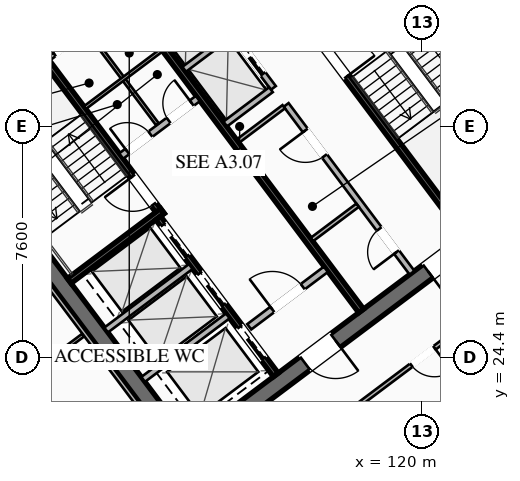
"""IFC4 building model, lengths in metres.
Left out: names, types, materials, properties, quantities, classifications, styles, units other than length and angle.
Written with IfcOpenShell. Run it as: python <this file> out.ifc"""

import sys

from ifc_helpers import new_model, si_unit, direction, frame, frame_2d, origin, place, context, subcontext, project, spatial, rectangle, extrude, element, fill, save


model = new_model("IFC4")
c1 = context("Model", 3, precision=1e-05, world=origin(), true_north=direction((0.0, 1.0)))
c2 = subcontext(c1, "Body", "Model", "MODEL_VIEW")
j1 = project(units=[si_unit("LENGTHUNIT", "METRE"), si_unit("PLANEANGLEUNIT", "RADIAN")], contexts=[c1])
p1 = place(None, origin())
s1 = spatial("IfcSite", under=j1, at=p1, CompositionType="ELEMENT")
p2 = place(p1, origin())
s2 = spatial("IfcBuilding", under=s1, at=p2, CompositionType="ELEMENT")
p3 = place(p2, frame((0.0, 0.0, 160.55)))
s3 = spatial("IfcBuildingStorey", under=s2, at=p3, CompositionType="ELEMENT", Elevation=160.55)
for number, where, z_axis, x_axis in (
    (1, (112.436, 21.077, 0.0), (0.0, 0.0, 1.0), (-0.6, 0.8, 0.0)),
    (2, (115.564, 42.923, 0.0), (0.0, 0.0, 1.0), (0.6, -0.8, 0.0)),
):
    element("IfcWall", number, at=place(p3, frame(where, z_axis=z_axis, x_axis=x_axis)), inside=s3, PredefinedType="SHEAR", context=c2, shape_type="SweptSolid", body=[
        extrude(rectangle(XDim=15.6, YDim=0.55, at=frame_2d((7.8, 0.0))), origin(), (0.0, 0.0, 1.0), 3.55),
    ])
p4 = place(p3, frame((124.539, 30.498, 0.0), z_axis=(0.0, 0.0, 1.0), x_axis=(-0.799998054672, -0.600002593761, 0.0)))
e3 = element("IfcWall", 3, at=p4, inside=s3, PredefinedType="SHEAR", context=c2, shape_type="SweptSolid", body=[
    extrude(rectangle(XDim=15.06, YDim=0.55, at=frame_2d((7.53, 0.0))), origin(), (0.0, 0.0, 1.0), 3.55),
])
p5 = place(p4, frame((9.23, 0.0, 0.0)))
e4 = element("IfcOpeningElement", 4, at=p5, cuts=e3, PredefinedType="OPENING", context=c2, shape_type="SweptSolid", body=[
    extrude(rectangle(XDim=1.25, YDim=2.25, at=frame_2d((0.625, 1.125))), frame((0.0, 0.285, 0.0), z_axis=(0.0, -1.0, 0.0), x_axis=(1.0, 0.0, 0.0)), (0.0, 0.0, 1.0), 0.57),
])
p6 = place(p4, frame((4.18, 0.0, 0.0)))
e5 = element("IfcOpeningElement", 5, at=p6, cuts=e3, PredefinedType="OPENING", context=c2, shape_type="SweptSolid", body=[
    extrude(rectangle(XDim=1.25, YDim=2.25, at=frame_2d((0.625, 1.125))), frame((0.0, 0.285, 0.0), z_axis=(0.0, -1.0, 0.0), x_axis=(1.0, 0.0, 0.0)), (0.0, 0.0, 1.0), 0.57),
])
p7 = place(p3, frame((103.461, 33.502, 0.0), z_axis=(0.0, 0.0, 1.0), x_axis=(0.799998054672, 0.600002593761, 0.0)))
e6 = element("IfcWall", 6, at=p7, inside=s3, PredefinedType="SHEAR", context=c2, shape_type="SweptSolid", body=[
    extrude(rectangle(XDim=15.06, YDim=0.55, at=frame_2d((7.53, 0.0))), origin(), (0.0, 0.0, 1.0), 3.55),
])
p8 = place(p7, frame((4.58, 0.0, 0.0)))
e7 = element("IfcOpeningElement", 7, at=p8, cuts=e6, PredefinedType="OPENING", context=c2, shape_type="SweptSolid", body=[
    extrude(rectangle(XDim=1.25, YDim=2.25, at=frame_2d((0.625, 1.125))), frame((0.0, 0.285, 0.0), z_axis=(0.0, -1.0, 0.0), x_axis=(1.0, 0.0, 0.0)), (0.0, 0.0, 1.0), 0.57),
])
p9 = place(p7, frame((9.63, 0.0, 0.0)))
e8 = element("IfcOpeningElement", 8, at=p9, cuts=e6, PredefinedType="OPENING", context=c2, shape_type="SweptSolid", body=[
    extrude(rectangle(XDim=1.25, YDim=2.25, at=frame_2d((0.625, 1.125))), frame((0.0, 0.285, 0.0), z_axis=(0.0, -1.0, 0.0), x_axis=(1.0, 0.0, 0.0)), (0.0, 0.0, 1.0), 0.57),
])
p10 = place(p3, frame((111.44, 29.08, 0.0), z_axis=(0.0, 0.0, 1.0), x_axis=(-0.59999029481, 0.8000072788, 0.0)))
e9 = element("IfcWall", 9, at=p10, inside=s3, PredefinedType="SHEAR", context=c2, shape_type="SweptSolid", body=[
    extrude(rectangle(XDim=8.05, YDim=0.2, at=frame_2d((4.025, 0.0))), origin(), (0.0, 0.0, 1.0), 3.37),
])
p11 = place(p10, frame((0.45, 0.0, 0.0)))
e10 = element("IfcOpeningElement", 10, at=p11, cuts=e9, PredefinedType="OPENING", context=c2, shape_type="SweptSolid", body=[
    extrude(rectangle(XDim=1.15, YDim=2.2, at=frame_2d((0.575, 1.1))), frame((0.0, 0.11, 0.0), z_axis=(0.0, -1.0, 0.0), x_axis=(1.0, 0.0, 0.0)), (0.0, 0.0, 1.0), 0.22),
])
p12 = place(p3, frame((108.396, 26.922, 0.0), z_axis=(0.0, 0.0, 1.0), x_axis=(0.800015298837, 0.599979601008, 0.0)))
e11 = element("IfcWall", 11, at=p12, inside=s3, PredefinedType="SHEAR", context=c2, shape_type="SweptSolid", body=[
    extrude(rectangle(XDim=3.83, YDim=0.2, at=frame_2d((1.915, 0.0))), origin(), (0.0, 0.0, 1.0), 3.37),
])
p13 = place(p3, frame((116.56, 34.92, 0.0), z_axis=(0.0, 0.0, 1.0), x_axis=(0.59999029481, -0.8000072788, 0.0)))
e12 = element("IfcWall", 12, at=p13, inside=s3, PredefinedType="SHEAR", context=c2, shape_type="SweptSolid", body=[
    extrude(rectangle(XDim=8.05, YDim=0.2, at=frame_2d((4.025, 0.0))), origin(), (0.0, 0.0, 1.0), 3.37),
])
p14 = place(p13, frame((0.45, 0.0, 0.0)))
e13 = element("IfcOpeningElement", 13, at=p14, cuts=e12, PredefinedType="OPENING", context=c2, shape_type="SweptSolid", body=[
    extrude(rectangle(XDim=1.15, YDim=2.2, at=frame_2d((0.575, 1.1))), frame((0.0, 0.11, 0.0), z_axis=(0.0, -1.0, 0.0), x_axis=(1.0, 0.0, 0.0)), (0.0, 0.0, 1.0), 0.22),
])
p15 = place(p3, frame((117.998, 25.936, 0.0), z_axis=(0.0, 0.0, 1.0), x_axis=(-0.600002693989, 0.799997979501, 0.0)))
e14 = element("IfcWall", 14, at=p15, inside=s3, PredefinedType="SHEAR", context=c2, shape_type="SweptSolid", body=[
    extrude(rectangle(XDim=14.5, YDim=0.2, at=frame_2d((7.25, 0.0))), origin(), (0.0, 0.0, 1.0), 3.37),
])
p16 = place(p3, frame((110.104, 31.028, 0.0), z_axis=(0.0, 0.0, 1.0), x_axis=(0.800018601094, 0.59997519774, 0.0)))
e15 = element("IfcWall", 15, at=p16, inside=s3, PredefinedType="SOLIDWALL", context=c2, shape_type="SweptSolid", body=[
    extrude(rectangle(XDim=3.15, YDim=0.22, at=frame_2d((1.575, 0.0))), origin(), (0.0, 0.0, 1.0), 2.723),
])
p17 = place(p16, frame((0.25, 0.0, 0.0)))
e16 = element("IfcOpeningElement", 16, at=p17, cuts=e15, PredefinedType="OPENING", context=c2, shape_type="SweptSolid", body=[
    extrude(rectangle(XDim=0.95, YDim=2.05, at=frame_2d((0.475, 1.025))), frame((0.0, 0.12, 0.0), z_axis=(0.0, -1.0, 0.0), x_axis=(1.0, 0.0, 0.0)), (0.0, 0.0, 1.0), 0.24),
])
p18 = place(p16, frame((1.95, 0.0, 0.0)))
e17 = element("IfcOpeningElement", 17, at=p18, cuts=e15, PredefinedType="OPENING", context=c2, shape_type="SweptSolid", body=[
    extrude(rectangle(XDim=0.95, YDim=2.05, at=frame_2d((0.475, 1.025))), frame((0.0, 0.12, 0.0), z_axis=(0.0, -1.0, 0.0), x_axis=(1.0, 0.0, 0.0)), (0.0, 0.0, 1.0), 0.24),
])
p19 = place(p3, frame((114.316, 25.412, 0.0), z_axis=(0.0, 0.0, 1.0), x_axis=(0.800018601094, 0.59997519774, 0.0)))
e18 = element("IfcWall", 18, at=p19, inside=s3, PredefinedType="SOLIDWALL", context=c2, shape_type="SweptSolid", body=[
    extrude(rectangle(XDim=3.15, YDim=0.22, at=frame_2d((1.575, 0.0))), origin(), (0.0, 0.0, 1.0), 2.723),
])
p20 = place(p19, frame((0.95, 0.0, 0.0)))
e19 = element("IfcOpeningElement", 19, at=p20, cuts=e18, PredefinedType="OPENING", context=c2, shape_type="SweptSolid", body=[
    extrude(rectangle(XDim=1.25, YDim=2.25, at=frame_2d((0.625, 1.125))), frame((0.0, 0.12, 0.0), z_axis=(0.0, -1.0, 0.0), x_axis=(1.0, 0.0, 0.0)), (0.0, 0.0, 1.0), 0.24),
])
p21 = place(p3, frame((115.19, 23.83, 0.0), z_axis=(0.0, 0.0, 1.0), x_axis=(-0.599993943644, 0.800004542231, 0.0)))
e20 = element("IfcWall", 20, at=p21, inside=s3, PredefinedType="SHEAR", context=c2, shape_type="SweptSolid", body=[
    extrude(rectangle(XDim=6.45, YDim=0.2, at=frame_2d((3.225, 0.0))), origin(), (0.0, 0.0, 1.0), 3.37),
])
p22 = place(p21, frame((4.875, 0.0, 0.0)))
e21 = element("IfcOpeningElement", 21, at=p22, cuts=e20, PredefinedType="OPENING", context=c2, shape_type="SweptSolid", body=[
    extrude(rectangle(XDim=1.3, YDim=2.25, at=frame_2d((0.65, 1.125))), frame((0.0, 0.11, 0.0), z_axis=(0.0, -1.0, 0.0), x_axis=(1.0, 0.0, 0.0)), (0.0, 0.0, 1.0), 0.22),
])
p23 = place(p21, frame((2.875, 0.0, 0.0)))
e22 = element("IfcOpeningElement", 22, at=p23, cuts=e20, PredefinedType="OPENING", context=c2, shape_type="SweptSolid", body=[
    extrude(rectangle(XDim=1.3, YDim=2.25, at=frame_2d((0.65, 1.125))), frame((0.0, 0.11, 0.0), z_axis=(0.0, -1.0, 0.0), x_axis=(1.0, 0.0, 0.0)), (0.0, 0.0, 1.0), 0.22),
])
p24 = place(p21, frame((0.675, 0.0, 0.0)))
e23 = element("IfcOpeningElement", 23, at=p24, cuts=e20, PredefinedType="OPENING", context=c2, shape_type="SweptSolid", body=[
    extrude(rectangle(XDim=1.3, YDim=2.25, at=frame_2d((0.65, 1.125))), frame((0.0, 0.11, 0.0), z_axis=(0.0, -1.0, 0.0), x_axis=(1.0, 0.0, 0.0)), (0.0, 0.0, 1.0), 0.22),
])
for number, where, z_axis, x_axis in (
    (24, (110.826, 23.682, 0.0), (0.0, 0.0, 1.0), (0.8, 0.6, 0.0)),
    (25, (109.608, 25.306, 0.0), (0.0, 0.0, 1.0), (0.8, 0.6, 0.0)),
):
    element("IfcWall", number, at=place(p3, frame(where, z_axis=z_axis, x_axis=x_axis)), inside=s3, PredefinedType="SOLIDWALL", context=c2, shape_type="SweptSolid", body=[
        extrude(rectangle(XDim=3.48, YDim=0.2, at=frame_2d((1.74, 0.0))), origin(), (0.0, 0.0, 1.0), 3.37),
    ])
p25 = place(p3, frame((107.71, 34.22, 0.0), z_axis=(0.0, 0.0, 1.0), x_axis=(0.799981399002, 0.60002480053, 0.0)))
e26 = element("IfcWall", 26, at=p25, inside=s3, PredefinedType="PARTITIONING", context=c2, shape_type="SweptSolid", body=[
    extrude(rectangle(XDim=3.15, YDim=0.135, at=frame_2d((1.575, 0.0))), origin(), (0.0, 0.0, 1.0), 2.723),
])
p26 = place(p25, frame((0.25, 0.0, 0.0)))
e27 = element("IfcOpeningElement", 27, at=p26, cuts=e26, PredefinedType="OPENING", context=c2, shape_type="SweptSolid", body=[
    extrude(rectangle(XDim=0.95, YDim=2.05, at=frame_2d((0.475, 1.025))), frame((0.0, 0.077, 0.0), z_axis=(0.0, -1.0, 0.0), x_axis=(1.0, 0.0, 0.0)), (0.0, 0.0, 1.0), 0.155),
])
p27 = place(p25, frame((1.95, 0.0, 0.0)))
e28 = element("IfcOpeningElement", 28, at=p27, cuts=e26, PredefinedType="OPENING", context=c2, shape_type="SweptSolid", body=[
    extrude(rectangle(XDim=0.95, YDim=2.05, at=frame_2d((0.475, 1.025))), frame((0.0, 0.077, 0.0), z_axis=(0.0, -1.0, 0.0), x_axis=(1.0, 0.0, 0.0)), (0.0, 0.0, 1.0), 0.155),
])
p28 = place(p3, frame((111.296, 32.072, 0.0), z_axis=(0.0, 0.0, 1.0), x_axis=(-0.59995887973, 0.800030838552, 0.0)))
e29 = element("IfcWall", 29, at=p28, inside=s3, PredefinedType="PARTITIONING", context=c2, shape_type="SweptSolid", body=[
    extrude(rectangle(XDim=3.8, YDim=0.11, at=frame_2d((1.9, 0.0))), origin(), (0.0, 0.0, 1.0), 2.723),
])
p29 = place(p3, frame((108.91, 32.62, 0.0), z_axis=(0.0, 0.0, 1.0), x_axis=(0.800018601094, 0.59997519774, 0.0)))
e30 = element("IfcWall", 30, at=p29, inside=s3, PredefinedType="PARTITIONING", context=c2, shape_type="SweptSolid", body=[
    extrude(rectangle(XDim=3.15, YDim=0.11, at=frame_2d((1.575, 0.0))), origin(), (0.0, 0.0, 1.0), 2.723),
])
p30 = place(p3, frame((119.67, 27.19, 0.0), z_axis=(0.0, 0.0, 1.0), x_axis=(-0.599988677396, 0.800008491828, 0.0)))
e31 = element("IfcWall", 31, at=p30, inside=s3, PredefinedType="SOLIDWALL", context=c2, shape_type="SweptSolid", body=[
    extrude(rectangle(XDim=6.9, YDim=0.2, at=frame_2d((3.45, 0.0))), origin(), (0.0, 0.0, 1.0), 2.723),
])
p31 = place(p30, frame((0.85, 0.0, 0.0)))
e32 = element("IfcOpeningElement", 32, at=p31, cuts=e31, PredefinedType="OPENING", context=c2, shape_type="SweptSolid", body=[
    extrude(rectangle(XDim=0.95, YDim=2.05, at=frame_2d((0.475, 1.025))), frame((0.0, 0.11, 0.0), z_axis=(0.0, -1.0, 0.0), x_axis=(1.0, 0.0, 0.0)), (0.0, 0.0, 1.0), 0.22),
])
p32 = place(p30, frame((4.8, 0.0, 0.0)))
e33 = element("IfcOpeningElement", 33, at=p32, cuts=e31, PredefinedType="OPENING", context=c2, shape_type="SweptSolid", body=[
    extrude(rectangle(XDim=1.05, YDim=2.2, at=frame_2d((0.525, 1.1))), frame((0.0, 0.11, 0.0), z_axis=(0.0, -1.0, 0.0), x_axis=(1.0, 0.0, 0.0)), (0.0, 0.0, 1.0), 0.22),
])
for number, where, z_axis, x_axis in (
    (34, (113.946, 31.522, 0.0), (0.0, 0.0, 1.0), (0.8, 0.6, 0.0)),
    (35, (116.376, 28.282, 0.0), (0.0, 0.0, 1.0), (0.8, 0.6, 0.0)),
):
    element("IfcWall", number, at=place(p3, frame(where, z_axis=z_axis, x_axis=x_axis)), inside=s3, PredefinedType="PARTITIONING", context=c2, shape_type="SweptSolid", body=[
        extrude(rectangle(XDim=1.88, YDim=0.135, at=frame_2d((0.94, 0.0))), origin(), (0.0, 0.0, 1.0), 2.723),
    ])
p33 = place(p3, frame((115.11, 33.27, 0.0), z_axis=(0.0, 0.0, 1.0), x_axis=(-0.600011322243, 0.799991508192, 0.0)))
e36 = element("IfcWall", 36, at=p33, inside=s3, PredefinedType="SOLIDWALL", context=c2, shape_type="SweptSolid", body=[
    extrude(rectangle(XDim=6.9, YDim=0.2, at=frame_2d((3.45, 0.0))), origin(), (0.0, 0.0, 1.0), 3.37),
])
p34 = place(p33, frame((0.575, 0.0, 0.0)))
e37 = element("IfcOpeningElement", 37, at=p34, cuts=e36, PredefinedType="OPENING", context=c2, shape_type="SweptSolid", body=[
    extrude(rectangle(XDim=1.1, YDim=2.2, at=frame_2d((0.55, 1.1))), frame((0.0, 0.11, 0.0), z_axis=(0.0, -1.0, 0.0), x_axis=(1.0, 0.0, 0.0)), (0.0, 0.0, 1.0), 0.22),
])
p35 = place(p33, frame((2.825, 0.0, 0.0)))
e38 = element("IfcOpeningElement", 38, at=p35, cuts=e36, PredefinedType="OPENING", context=c2, shape_type="SweptSolid", body=[
    extrude(rectangle(XDim=1.1, YDim=2.2, at=frame_2d((0.55, 1.1))), frame((0.0, 0.11, 0.0), z_axis=(0.0, -1.0, 0.0), x_axis=(1.0, 0.0, 0.0)), (0.0, 0.0, 1.0), 0.22),
])
p36 = place(p33, frame((5.075, 0.0, 0.0)))
e39 = element("IfcOpeningElement", 39, at=p36, cuts=e36, PredefinedType="OPENING", context=c2, shape_type="SweptSolid", body=[
    extrude(rectangle(XDim=1.1, YDim=2.2, at=frame_2d((0.55, 1.1))), frame((0.0, 0.11, 0.0), z_axis=(0.0, -1.0, 0.0), x_axis=(1.0, 0.0, 0.0)), (0.0, 0.0, 1.0), 0.22),
])
p37 = place(p3, frame((113.526, 32.082, 0.0), z_axis=(0.0, 0.0, 1.0), x_axis=(0.800046745961, 0.599937666993, 0.0)))
e40 = element("IfcWall", 40, at=p37, inside=s3, PredefinedType="SOLIDWALL", context=c2, shape_type="SweptSolid", body=[
    extrude(rectangle(XDim=1.88, YDim=0.2, at=frame_2d((0.94, 0.0))), origin(), (0.0, 0.0, 1.0), 3.37),
])
p38 = place(p3, frame((112.176, 33.882, 0.0), z_axis=(0.0, 0.0, 1.0), x_axis=(0.8, 0.6, 0.0)))
e41 = element("IfcWall", 41, at=p38, inside=s3, PredefinedType="SOLIDWALL", context=c2, shape_type="SweptSolid", body=[
    extrude(rectangle(XDim=1.88, YDim=0.2, at=frame_2d((0.94, 0.0))), origin(), (0.0, 0.0, 1.0), 3.37),
])
p39 = place(p3, frame((95.8, 32.35, 0.0), z_axis=(0.0, 0.0, 1.0), x_axis=(0.8, 0.6, 0.0)))
e42 = element("IfcWall", 42, at=p39, inside=s3, PredefinedType="PARTITIONING", context=c2, shape_type="SweptSolid", body=[
    extrude(rectangle(XDim=28.7, YDim=0.135, at=frame_2d((14.35, 0.0))), origin(), (0.0, 0.0, 1.0), 2.723),
])
p40 = place(p39, frame((0.3, 0.0, 0.0)))
e43 = element("IfcOpeningElement", 43, at=p40, cuts=e42, PredefinedType="OPENING", context=c2, shape_type="SweptSolid", body=[
    extrude(rectangle(XDim=0.95, YDim=2.05, at=frame_2d((0.475, 1.025))), frame((0.0, 0.077, 0.0), z_axis=(0.0, -1.0, 0.0), x_axis=(1.0, 0.0, 0.0)), (0.0, 0.0, 1.0), 0.155),
])
p41 = place(p39, frame((9.959, 0.0, 0.0)))
e44 = element("IfcOpeningElement", 44, at=p41, cuts=e42, PredefinedType="OPENING", context=c2, shape_type="SweptSolid", body=[
    extrude(rectangle(XDim=0.95, YDim=2.05, at=frame_2d((0.475, 1.025))), frame((0.0, 0.077, 0.0), z_axis=(0.0, -1.0, 0.0), x_axis=(1.0, 0.0, 0.0)), (0.0, 0.0, 1.0), 0.155),
])
p42 = place(p39, frame((14.005, 0.0, 0.0)))
e45 = element("IfcOpeningElement", 45, at=p42, cuts=e42, PredefinedType="OPENING", context=c2, shape_type="SweptSolid", body=[
    extrude(rectangle(XDim=0.95, YDim=2.05, at=frame_2d((0.475, 1.025))), frame((0.0, 0.077, 0.0), z_axis=(0.0, -1.0, 0.0), x_axis=(1.0, 0.0, 0.0)), (0.0, 0.0, 1.0), 0.155),
])
p43 = place(p39, frame((18.049, 0.0, 0.0)))
e46 = element("IfcOpeningElement", 46, at=p43, cuts=e42, PredefinedType="OPENING", context=c2, shape_type="SweptSolid", body=[
    extrude(rectangle(XDim=0.95, YDim=2.05, at=frame_2d((0.475, 1.025))), frame((0.0, 0.077, 0.0), z_axis=(0.0, -1.0, 0.0), x_axis=(1.0, 0.0, 0.0)), (0.0, 0.0, 1.0), 0.155),
])
p44 = place(p39, frame((27.45, 0.0, 0.0)))
e47 = element("IfcOpeningElement", 47, at=p44, cuts=e42, PredefinedType="OPENING", context=c2, shape_type="SweptSolid", body=[
    extrude(rectangle(XDim=0.95, YDim=2.05, at=frame_2d((0.475, 1.025))), frame((0.0, 0.077, 0.0), z_axis=(0.0, -1.0, 0.0), x_axis=(1.0, 0.0, 0.0)), (0.0, 0.0, 1.0), 0.155),
])
p45 = place(p3, frame((131.282, 32.874, 0.0), z_axis=(0.0, 0.0, 1.0), x_axis=(-0.8, -0.6, 0.0)))
e48 = element("IfcWall", 48, at=p45, inside=s3, PredefinedType="PARTITIONING", context=c2, shape_type="SweptSolid", body=[
    extrude(rectangle(XDim=28.7, YDim=0.135, at=frame_2d((14.35, 0.0))), origin(), (0.0, 0.0, 1.0), 2.723),
])
p46 = place(p45, frame((27.37, 0.0, 0.0)))
e49 = element("IfcOpeningElement", 49, at=p46, cuts=e48, PredefinedType="OPENING", context=c2, shape_type="SweptSolid", body=[
    extrude(rectangle(XDim=0.95, YDim=2.05, at=frame_2d((0.475, 1.025))), frame((0.0, 0.077, 0.0), z_axis=(0.0, -1.0, 0.0), x_axis=(1.0, 0.0, 0.0)), (0.0, 0.0, 1.0), 0.155),
])
p47 = place(p45, frame((13.592, 0.0, 0.0)))
e50 = element("IfcOpeningElement", 50, at=p47, cuts=e48, PredefinedType="OPENING", context=c2, shape_type="SweptSolid", body=[
    extrude(rectangle(XDim=0.95, YDim=2.05, at=frame_2d((0.475, 1.025))), frame((0.0, 0.077, 0.0), z_axis=(0.0, -1.0, 0.0), x_axis=(1.0, 0.0, 0.0)), (0.0, 0.0, 1.0), 0.155),
])
p48 = place(p45, frame((0.38, 0.0, 0.0)))
e51 = element("IfcOpeningElement", 51, at=p48, cuts=e48, PredefinedType="OPENING", context=c2, shape_type="SweptSolid", body=[
    extrude(rectangle(XDim=0.95, YDim=2.05, at=frame_2d((0.475, 1.025))), frame((0.0, 0.077, 0.0), z_axis=(0.0, -1.0, 0.0), x_axis=(1.0, 0.0, 0.0)), (0.0, 0.0, 1.0), 0.155),
])
p49 = place(p3, frame((112.104, 20.928, 0.0), z_axis=(0.0, 0.0, 1.0), x_axis=(-0.599994940075, 0.800003794918, 0.0)))
e52 = element("IfcWall", 52, at=p49, inside=s3, PredefinedType="PARTITIONING", context=c2, shape_type="SweptSolid", body=[
    extrude(rectangle(XDim=15.44, YDim=0.135, at=frame_2d((7.72, 0.0))), origin(), (0.0, 0.0, 1.0), 2.723),
])
p50 = place(p3, frame((102.016, 20.012, 0.0), z_axis=(0.0, 0.0, 1.0), x_axis=(0.799989708052, 0.600013722352, 0.0)))
e53 = element("IfcWall", 53, at=p50, inside=s3, PredefinedType="PARTITIONING", context=c2, shape_type="SweptSolid", body=[
    extrude(rectangle(XDim=8.54, YDim=0.11, at=frame_2d((4.27, 0.0))), origin(), (0.0, 0.0, 1.0), 2.723),
])
p51 = place(p5, origin())
e54 = element("IfcDoor", 54, at=p51, inside=s3, OperationType="SINGLE_SWING_LEFT", PredefinedType="DOOR", context=c2, shape_type="SweptSolid", body=[
    extrude(rectangle(XDim=1.25, YDim=2.25, at=frame_2d((0.625, 1.125))), frame((0.0, 0.025, 0.0), z_axis=(0.0, -1.0, 0.0), x_axis=(1.0, 0.0, 0.0)), (0.0, 0.0, 1.0), 0.05),
])
fill(e4, e54)
p52 = place(p6, origin())
e55 = element("IfcDoor", 55, at=p52, inside=s3, OperationType="SINGLE_SWING_RIGHT", PredefinedType="DOOR", context=c2, shape_type="SweptSolid", body=[
    extrude(rectangle(XDim=1.25, YDim=2.25, at=frame_2d((0.625, 1.125))), frame((0.0, 0.025, 0.0), z_axis=(0.0, -1.0, 0.0), x_axis=(1.0, 0.0, 0.0)), (0.0, 0.0, 1.0), 0.05),
])
fill(e5, e55)
p53 = place(p11, origin())
e56 = element("IfcDoor", 56, at=p53, inside=s3, OperationType="SINGLE_SWING_RIGHT", PredefinedType="DOOR", context=c2, shape_type="SweptSolid", body=[
    extrude(rectangle(XDim=1.15, YDim=2.2, at=frame_2d((0.575, 1.1))), frame((0.0, 0.025, 0.0), z_axis=(0.0, -1.0, 0.0), x_axis=(1.0, 0.0, 0.0)), (0.0, 0.0, 1.0), 0.05),
])
fill(e10, e56)
p54 = place(p14, origin())
e57 = element("IfcDoor", 57, at=p54, inside=s3, OperationType="SINGLE_SWING_RIGHT", PredefinedType="DOOR", context=c2, shape_type="SweptSolid", body=[
    extrude(rectangle(XDim=1.15, YDim=2.2, at=frame_2d((0.575, 1.1))), frame((0.0, 0.025, 0.0), z_axis=(0.0, -1.0, 0.0), x_axis=(1.0, 0.0, 0.0)), (0.0, 0.0, 1.0), 0.05),
])
fill(e13, e57)
p55 = place(p20, origin())
e58 = element("IfcDoor", 58, at=p55, inside=s3, OperationType="SINGLE_SWING_LEFT", PredefinedType="DOOR", context=c2, shape_type="SweptSolid", body=[
    extrude(rectangle(XDim=1.25, YDim=2.25, at=frame_2d((0.625, 1.125))), frame((0.0, 0.025, 0.0), z_axis=(0.0, -1.0, 0.0), x_axis=(1.0, 0.0, 0.0)), (0.0, 0.0, 1.0), 0.05),
])
fill(e19, e58)
p56 = place(p26, origin())
e59 = element("IfcDoor", 59, at=p56, inside=s3, OperationType="SINGLE_SWING_LEFT", PredefinedType="DOOR", context=c2, shape_type="SweptSolid", body=[
    extrude(rectangle(XDim=0.95, YDim=2.05, at=frame_2d((0.475, 1.025))), frame((0.0, 0.025, 0.0), z_axis=(0.0, -1.0, 0.0), x_axis=(1.0, 0.0, 0.0)), (0.0, 0.0, 1.0), 0.05),
])
fill(e27, e59)
p57 = place(p17, origin())
e60 = element("IfcDoor", 60, at=p57, inside=s3, OperationType="SINGLE_SWING_LEFT", PredefinedType="DOOR", context=c2, shape_type="SweptSolid", body=[
    extrude(rectangle(XDim=0.95, YDim=2.05, at=frame_2d((0.475, 1.025))), frame((0.0, 0.025, 0.0), z_axis=(0.0, -1.0, 0.0), x_axis=(1.0, 0.0, 0.0)), (0.0, 0.0, 1.0), 0.05),
])
fill(e16, e60)
p58 = place(p18, origin())
e61 = element("IfcDoor", 61, at=p58, inside=s3, OperationType="SINGLE_SWING_RIGHT", PredefinedType="DOOR", context=c2, shape_type="SweptSolid", body=[
    extrude(rectangle(XDim=0.95, YDim=2.05, at=frame_2d((0.475, 1.025))), frame((0.0, 0.025, 0.0), z_axis=(0.0, -1.0, 0.0), x_axis=(1.0, 0.0, 0.0)), (0.0, 0.0, 1.0), 0.05),
])
fill(e17, e61)
p59 = place(p31, origin())
e62 = element("IfcDoor", 62, at=p59, inside=s3, OperationType="SINGLE_SWING_LEFT", PredefinedType="DOOR", context=c2, shape_type="SweptSolid", body=[
    extrude(rectangle(XDim=0.95, YDim=2.05, at=frame_2d((0.475, 1.025))), frame((0.0, 0.025, 0.0), z_axis=(0.0, -1.0, 0.0), x_axis=(1.0, 0.0, 0.0)), (0.0, 0.0, 1.0), 0.05),
])
fill(e32, e62)
p60 = place(p32, origin())
e63 = element("IfcDoor", 63, at=p60, inside=s3, OperationType="SINGLE_SWING_RIGHT", PredefinedType="DOOR", context=c2, shape_type="SweptSolid", body=[
    extrude(rectangle(XDim=1.05, YDim=2.2, at=frame_2d((0.525, 1.1))), frame((0.0, 0.025, 0.0), z_axis=(0.0, -1.0, 0.0), x_axis=(1.0, 0.0, 0.0)), (0.0, 0.0, 1.0), 0.05),
])
fill(e33, e63)
p61 = place(p47, origin())
e64 = element("IfcDoor", 64, at=p61, inside=s3, OperationType="SINGLE_SWING_LEFT", PredefinedType="DOOR", context=c2, shape_type="SweptSolid", body=[
    extrude(rectangle(XDim=0.95, YDim=2.05, at=frame_2d((0.475, 1.025))), frame((0.0, 0.025, 0.0), z_axis=(0.0, -1.0, 0.0), x_axis=(1.0, 0.0, 0.0)), (0.0, 0.0, 1.0), 0.05),
])
fill(e50, e64)
p62 = place(p22, origin())
e65 = element("IfcDoor", 65, at=p62, inside=s3, OperationType="SLIDING_TO_LEFT", PredefinedType="DOOR", context=c2, shape_type="SweptSolid", body=[
    extrude(rectangle(XDim=1.3, YDim=2.25, at=frame_2d((0.65, 1.125))), frame((0.0, 0.025, 0.0), z_axis=(0.0, -1.0, 0.0), x_axis=(1.0, 0.0, 0.0)), (0.0, 0.0, 1.0), 0.05),
])
fill(e21, e65)
p63 = place(p23, origin())
e66 = element("IfcDoor", 66, at=p63, inside=s3, OperationType="SLIDING_TO_LEFT", PredefinedType="DOOR", context=c2, shape_type="SweptSolid", body=[
    extrude(rectangle(XDim=1.3, YDim=2.25, at=frame_2d((0.65, 1.125))), frame((0.0, 0.025, 0.0), z_axis=(0.0, -1.0, 0.0), x_axis=(1.0, 0.0, 0.0)), (0.0, 0.0, 1.0), 0.05),
])
fill(e22, e66)
p64 = place(p24, origin())
e67 = element("IfcDoor", 67, at=p64, inside=s3, OperationType="SLIDING_TO_LEFT", PredefinedType="DOOR", context=c2, shape_type="SweptSolid", body=[
    extrude(rectangle(XDim=1.3, YDim=2.25, at=frame_2d((0.65, 1.125))), frame((0.0, 0.025, 0.0), z_axis=(0.0, -1.0, 0.0), x_axis=(1.0, 0.0, 0.0)), (0.0, 0.0, 1.0), 0.05),
])
fill(e23, e67)
p65 = place(p34, origin())
e68 = element("IfcDoor", 68, at=p65, inside=s3, OperationType="SLIDING_TO_LEFT", PredefinedType="DOOR", context=c2, shape_type="SweptSolid", body=[
    extrude(rectangle(XDim=1.1, YDim=2.2, at=frame_2d((0.55, 1.1))), frame((0.0, 0.025, 0.0), z_axis=(0.0, -1.0, 0.0), x_axis=(1.0, 0.0, 0.0)), (0.0, 0.0, 1.0), 0.05),
])
fill(e37, e68)
save(model, sys.argv[1])
